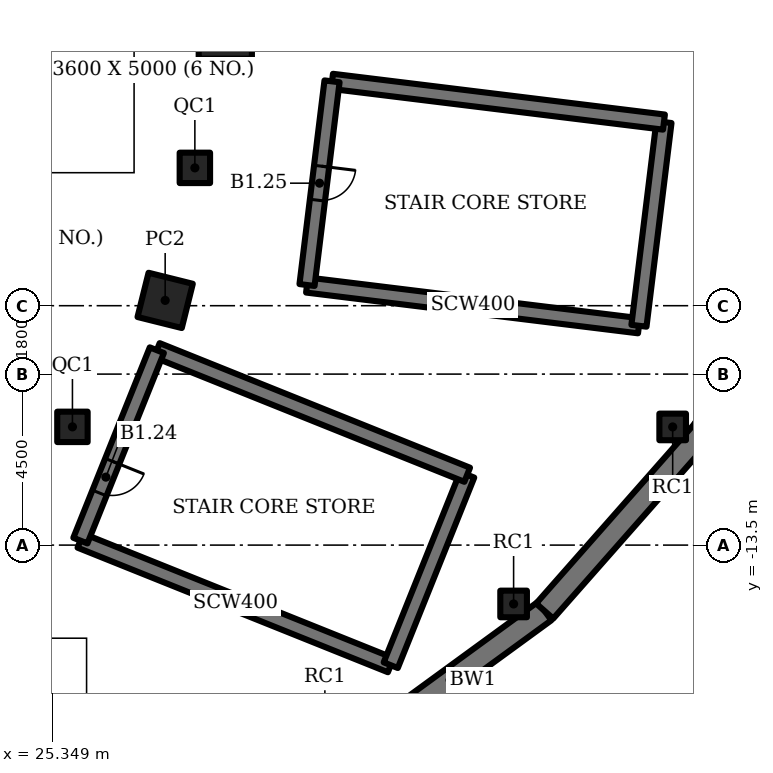
"""IFC4 building model, lengths in metres.
Left out: names, types, materials, properties, quantities, classifications, styles, units other than length and angle.
Written with IfcOpenShell. Run it as: python <this file> out.ifc"""

import sys

from ifc_helpers import new_model, si_unit, direction, frame, frame_2d, origin, origin_2d, place, context, subcontext, project, spatial, rectangle, hollow_rectangle, extrude, element, fill, save


model = new_model("IFC4")
c1 = context("Model", 3, precision=1e-05, world=origin(), true_north=direction((0.0, 1.0)))
c2 = subcontext(c1, "Body", "Model", "MODEL_VIEW")
j1 = project(units=[si_unit("LENGTHUNIT", "METRE"), si_unit("PLANEANGLEUNIT", "RADIAN")], contexts=[c1])
p1 = place(None, origin())
s1 = spatial("IfcSite", under=j1, at=p1, CompositionType="ELEMENT")
p2 = place(p1, origin())
s2 = spatial("IfcBuilding", under=s1, at=p2, CompositionType="ELEMENT")
p3 = place(p2, frame((0.0, 0.0, -5.5)))
s3 = spatial("IfcBuildingStorey", under=s2, at=p3, CompositionType="ELEMENT", Elevation=-5.5)
p4 = place(p3, frame((29.9, 0.0, 0.0), z_axis=(0.0, 0.0, 1.0), x_axis=(1.0, 0.0, 0.0)))
e1 = element("IfcColumn", 1, at=p4, inside=s3, PredefinedType="COLUMN", context=c2, shape_type="SweptSolid", body=[
    extrude(hollow_rectangle(XDim=1.4, YDim=1.4, WallThickness=0.1, at=origin_2d()), origin(), (0.0, 0.0, 1.0), 5.5),
])
p5 = place(p3, frame((28.318, -7.06, 0.0), z_axis=(0.0, 0.0, 1.0), x_axis=(0.2419218956, 0.970295726276, 0.0)))
e2 = element("IfcColumn", 2, at=p5, inside=s3, PredefinedType="COLUMN", context=c2, shape_type="SweptSolid", body=[
    extrude(hollow_rectangle(XDim=1.2, YDim=1.2, WallThickness=0.1, at=origin_2d()), origin(), (0.0, 0.0, 1.0), 5.5),
])
for number, where, z_axis, x_axis in (
    (3, (25.878, -10.388, 0.0), (0.0, 0.0, 1.0), (1.0, 0.0, 0.0)),
    (4, (29.099, -3.573, 0.0), (0.0, 0.0, 1.0), (1.0, 0.0, 0.0)),
):
    element("IfcColumn", number, at=place(p3, frame(where, z_axis=z_axis, x_axis=x_axis)), inside=s3, PredefinedType="COLUMN", context=c2, shape_type="SweptSolid", body=[
        extrude(hollow_rectangle(XDim=0.8, YDim=0.8, WallThickness=0.05, at=origin_2d()), origin(), (0.0, 0.0, 1.0), 5.5),
    ])
for number, where, z_axis, x_axis in (
    (5, (37.487, -15.049, 0.0), (0.0, 0.0, 1.0), (1.0, 0.0, 0.0)),
    (6, (41.672, -10.39, 0.0), (0.0, 0.0, 1.0), (1.0, 0.0, 0.0)),
):
    element("IfcColumn", number, at=place(p3, frame(where, z_axis=z_axis, x_axis=x_axis)), inside=s3, PredefinedType="COLUMN", context=c2, shape_type="SweptSolid", body=[
        extrude(hollow_rectangle(XDim=0.7, YDim=0.7, WallThickness=0.04, at=origin_2d()), origin(), (0.0, 0.0, 1.0), 5.5),
    ])
p6 = place(p3, frame((33.325, -18.867, 0.0), z_axis=(0.0, 0.0, 1.0), x_axis=(0.807914805436, 0.589299301847, 0.0)))
e7 = element("IfcWall", 7, at=p6, inside=s3, PredefinedType="SOLIDWALL", context=c2, shape_type="SweptSolid", body=[
    extrude(rectangle(XDim=6.163, YDim=0.6, at=frame_2d((3.082, 0.0))), origin(), (0.0, 0.0, 1.0), 5.5),
])
p7 = place(p3, frame((38.304, -15.235, 0.0), z_axis=(0.0, 0.0, 1.0), x_axis=(0.661181871868, 0.750225654262, 0.0)))
e8 = element("IfcWall", 8, at=p7, inside=s3, PredefinedType="SOLIDWALL", context=c2, shape_type="SweptSolid", body=[
    extrude(rectangle(XDim=6.336, YDim=0.6, at=frame_2d((3.168, 0.0))), origin(), (0.0, 0.0, 1.0), 5.5),
])
p8 = place(p3, frame((26.087, -13.382, 0.0), z_axis=(0.0, 0.0, 1.0), x_axis=(0.92801678004, -0.372538395288, 0.0)))
e9 = element("IfcWall", 9, at=p8, inside=s3, PredefinedType="SHEAR", context=c2, shape_type="SweptSolid", body=[
    extrude(rectangle(XDim=8.8, YDim=0.4, at=frame_2d((4.4, 0.0))), origin(), (0.0, 0.0, 1.0), 5.5),
])
p9 = place(p3, frame((34.253, -16.66, 0.0), z_axis=(0.0, 0.0, 1.0), x_axis=(0.372544066459, 0.928014503414, 0.0)))
e10 = element("IfcWall", 10, at=p9, inside=s3, PredefinedType="SHEAR", context=c2, shape_type="SweptSolid", body=[
    extrude(rectangle(XDim=5.4, YDim=0.4, at=frame_2d((2.7, 0.0))), origin(), (0.0, 0.0, 1.0), 5.5),
])
p10 = place(p3, frame((36.265, -11.649, 0.0), z_axis=(0.0, 0.0, 1.0), x_axis=(-0.928007188331, 0.372562287955, 0.0)))
e11 = element("IfcWall", 11, at=p10, inside=s3, PredefinedType="SHEAR", context=c2, shape_type="SweptSolid", body=[
    extrude(rectangle(XDim=8.8, YDim=0.4, at=frame_2d((4.4, 0.0))), origin(), (0.0, 0.0, 1.0), 5.5),
])
p11 = place(p3, frame((28.099, -8.37, 0.0), z_axis=(0.0, 0.0, 1.0), x_axis=(-0.372528436202, -0.928020777904, 0.0)))
e12 = element("IfcWall", 12, at=p11, inside=s3, PredefinedType="SHEAR", context=c2, shape_type="SweptSolid", body=[
    extrude(rectangle(XDim=5.4, YDim=0.4, at=frame_2d((2.7, 0.0))), origin(), (0.0, 0.0, 1.0), 5.5),
])
p12 = place(p11, frame((3.15, 0.0, 0.0)))
e13 = element("IfcOpeningElement", 13, at=p12, cuts=e12, PredefinedType="OPENING", context=c2, shape_type="SweptSolid", body=[
    extrude(rectangle(XDim=0.9, YDim=2.1, at=frame_2d((0.45, 1.05))), frame((0.0, 0.21, 0.0), z_axis=(0.0, -1.0, 0.0), x_axis=(1.0, 0.0, 0.0)), (0.0, 0.0, 1.0), 0.42),
])
p13 = place(p3, frame((32.051, -6.656, 0.0), z_axis=(0.0, 0.0, 1.0), x_axis=(0.992545280606, -0.121876437212, 0.0)))
e14 = element("IfcWall", 14, at=p13, inside=s3, PredefinedType="SHEAR", context=c2, shape_type="SweptSolid", body=[
    extrude(rectangle(XDim=8.8, YDim=0.4, at=frame_2d((4.4, 0.0))), origin(), (0.0, 0.0, 1.0), 5.5),
])
p14 = place(p3, frame((40.785, -7.728, 0.0), z_axis=(0.0, 0.0, 1.0), x_axis=(0.121892082937, 0.992543359314, 0.0)))
e15 = element("IfcWall", 15, at=p14, inside=s3, PredefinedType="SHEAR", context=c2, shape_type="SweptSolid", body=[
    extrude(rectangle(XDim=5.4, YDim=0.4, at=frame_2d((2.7, 0.0))), origin(), (0.0, 0.0, 1.0), 5.5),
])
p15 = place(p3, frame((41.443, -2.368, 0.0), z_axis=(0.0, 0.0, 1.0), x_axis=(-0.992545692684, 0.121873081252, 0.0)))
e16 = element("IfcWall", 16, at=p15, inside=s3, PredefinedType="SHEAR", context=c2, shape_type="SweptSolid", body=[
    extrude(rectangle(XDim=8.8, YDim=0.4, at=frame_2d((4.4, 0.0))), origin(), (0.0, 0.0, 1.0), 5.5),
])
p16 = place(p3, frame((32.708, -1.296, 0.0), z_axis=(0.0, 0.0, 1.0), x_axis=(-0.12184754212, -0.99254882826, 0.0)))
e17 = element("IfcWall", 17, at=p16, inside=s3, PredefinedType="SHEAR", context=c2, shape_type="SweptSolid", body=[
    extrude(rectangle(XDim=5.4, YDim=0.4, at=frame_2d((2.7, 0.0))), origin(), (0.0, 0.0, 1.0), 5.5),
])
p17 = place(p16, frame((2.25, 0.0, 0.0)))
e18 = element("IfcOpeningElement", 18, at=p17, cuts=e17, PredefinedType="OPENING", context=c2, shape_type="SweptSolid", body=[
    extrude(rectangle(XDim=0.9, YDim=2.1, at=frame_2d((0.45, 1.05))), frame((0.0, 0.21, 0.0), z_axis=(0.0, -1.0, 0.0), x_axis=(1.0, 0.0, 0.0)), (0.0, 0.0, 1.0), 0.42),
])
p18 = place(p12, origin())
e19 = element("IfcDoor", 19, at=p18, inside=s3, OperationType="SINGLE_SWING_LEFT", PredefinedType="DOOR", context=c2, shape_type="SweptSolid", body=[
    extrude(rectangle(XDim=0.9, YDim=2.1, at=frame_2d((0.45, 1.05))), frame((0.0, 0.025, 0.0), z_axis=(0.0, -1.0, 0.0), x_axis=(1.0, 0.0, 0.0)), (0.0, 0.0, 1.0), 0.05),
])
fill(e13, e19)
p19 = place(p17, origin())
e20 = element("IfcDoor", 20, at=p19, inside=s3, OperationType="SINGLE_SWING_LEFT", PredefinedType="DOOR", context=c2, shape_type="SweptSolid", body=[
    extrude(rectangle(XDim=0.9, YDim=2.1, at=frame_2d((0.45, 1.05))), frame((0.0, 0.025, 0.0), z_axis=(0.0, -1.0, 0.0), x_axis=(1.0, 0.0, 0.0)), (0.0, 0.0, 1.0), 0.05),
])
fill(e18, e20)
save(model, sys.argv[1])
